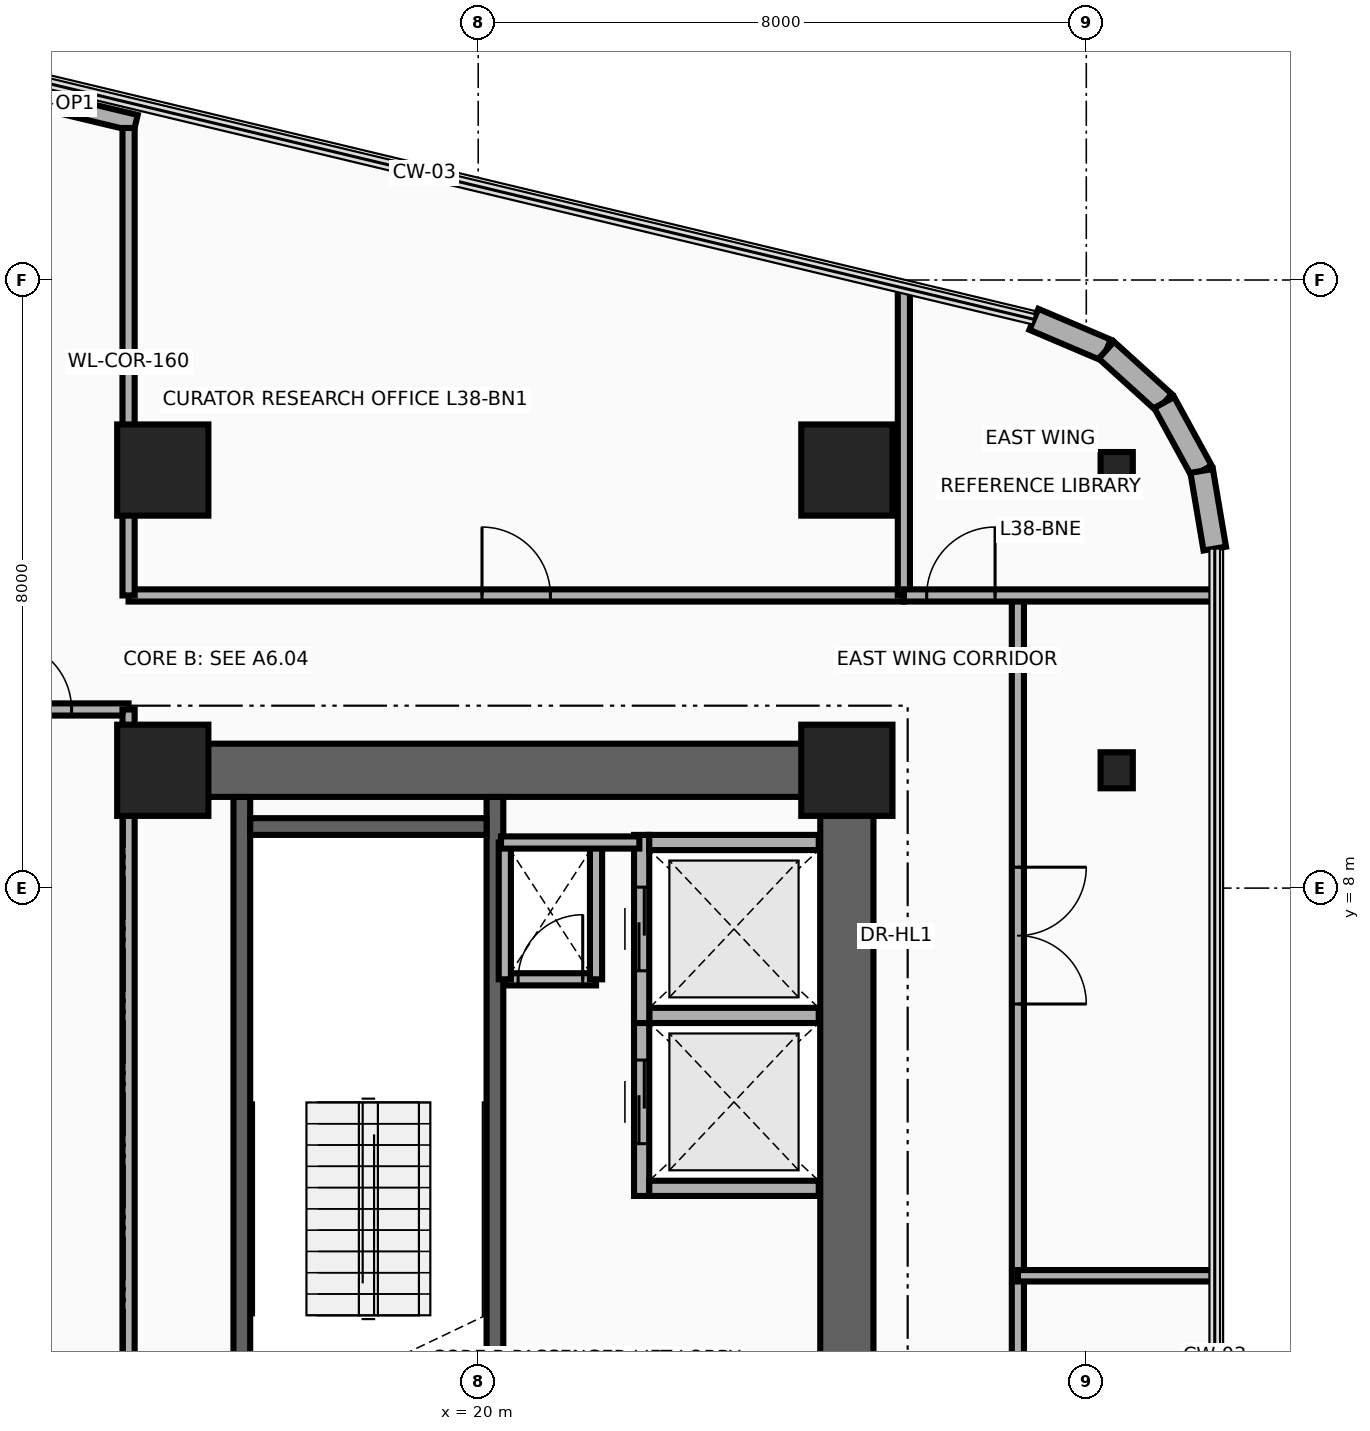
"""IFC4 building model, lengths in metres.
Left out: names, types, materials, properties, quantities, classifications, styles, units other than length and angle.
Written with IfcOpenShell. Run it as: python <this file> out.ifc"""

import sys

from ifc_helpers import new_model, si_unit, direction, frame, frame_2d, origin, origin_2d, place, context, subcontext, project, spatial, rectangle, i_section, extrude, source, transform, mapped, element, fill, save


model = new_model("IFC4")
c1 = context("Model", 3, precision=1e-05, world=origin(), true_north=direction((0.0, 1.0)))
c2 = subcontext(c1, "Body", "Model", "MODEL_VIEW")
j1 = project(units=[si_unit("LENGTHUNIT", "METRE"), si_unit("PLANEANGLEUNIT", "RADIAN")], contexts=[c1])
p1 = place(None, origin())
s1 = spatial("IfcSite", under=j1, at=p1, CompositionType="ELEMENT")
p2 = place(p1, origin())
s2 = spatial("IfcBuilding", under=s1, at=p2, CompositionType="ELEMENT")
p3 = place(p2, frame((0.0, 0.0, 150.1)))
s3 = spatial("IfcBuildingStorey", under=s2, at=p3, CompositionType="ELEMENT", Elevation=150.1)
for number, where, z_axis, x_axis in (
    (1, (16.89, 0.68, 0.0), (0.0, 0.0, 1.0), (0.0, 1.0, 0.0)),
    (2, (20.22, 0.68, 0.0), (0.0, 0.0, 1.0), (0.0, 1.0, 0.0)),
):
    element("IfcWall", number, at=place(p3, frame(where, z_axis=z_axis, x_axis=x_axis)), inside=s3, PredefinedType="SHEAR", context=c2, shape_type="SweptSolid", body=[
        extrude(rectangle(XDim=8.52, YDim=0.22, at=frame_2d((4.26, 0.0))), origin(), (0.0, 0.0, 1.0), 3.46),
    ])
p4 = place(p3, frame((17.0, 8.81, 0.0), z_axis=(0.0, 0.0, 1.0), x_axis=(1.0, 0.0, 0.0)))
e3 = element("IfcWall", 3, at=p4, inside=s3, PredefinedType="SHEAR", context=c2, shape_type="SweptSolid", body=[
    extrude(rectangle(XDim=3.11, YDim=0.22, at=frame_2d((1.555, 0.0))), origin(), (0.0, 0.0, 1.0), 3.46),
])
p5 = place(p3, frame((24.85, 0.95, 0.0), z_axis=(0.0, 0.0, 1.0), x_axis=(0.0, 1.0, 0.0)))
e4 = element("IfcWall", 4, at=p5, inside=s3, PredefinedType="SHEAR", context=c2, shape_type="SweptSolid", body=[
    extrude(rectangle(XDim=8.95, YDim=0.7, at=frame_2d((4.475, 0.0))), origin(), (0.0, 0.0, 1.0), 3.46),
])
p6 = place(p3, frame((15.85, 9.55, 0.0), z_axis=(0.0, 0.0, 1.0), x_axis=(1.0, 0.0, 0.0)))
e5 = element("IfcWall", 5, at=p6, inside=s3, PredefinedType="SHEAR", context=c2, shape_type="SweptSolid", body=[
    extrude(rectangle(XDim=9.0, YDim=0.7, at=frame_2d((4.5, 0.0))), origin(), (0.0, 0.0, 1.0), 3.46),
])
m1 = source(origin(), c2, "Body", "SweptSolid", [
    extrude(rectangle(XDim=1.2, YDim=1.2, at=origin_2d()), origin(), (0.0, 0.0, 1.0), 3.7),
])
for number, where, z_axis, x_axis in (
    (6, (15.85, 9.55, 0.0), (0.0, 0.0, 1.0), (1.0, 0.0, 0.0)),
    (7, (24.85, 9.55, 0.0), (0.0, 0.0, 1.0), (1.0, 0.0, 0.0)),
):
    element("IfcColumn", number, at=place(p3, frame(where, z_axis=z_axis, x_axis=x_axis)), inside=s3, PredefinedType="COLUMN", context=c2, shape_type="MappedRepresentation", body=[
        mapped(m1, transform((0.0, 0.0, 0.0), x_axis=(1.0, 0.0, 0.0), y_axis=(0.0, 1.0, 0.0), z_axis=(0.0, 0.0, 1.0), scale=1.0)),
    ])
m2 = source(origin(), c2, "Body", "SweptSolid", [
    extrude(i_section(OverallWidth=0.424, OverallDepth=0.474, WebThickness=0.048, FlangeThickness=0.077, at=origin_2d()), origin(), (0.0, 0.0, 1.0), 3.7),
])
p7 = place(p3, frame((28.4, 9.55, 0.0), z_axis=(0.0, 0.0, 1.0), x_axis=(1.0, 0.0, 0.0)))
e8 = element("IfcColumn", 8, at=p7, inside=s3, PredefinedType="COLUMN", context=c2, shape_type="MappedRepresentation", body=[
    mapped(m2, transform((0.0, 0.0, 0.0), x_axis=(1.0, 0.0, 0.0), y_axis=(0.0, 1.0, 0.0), z_axis=(0.0, 0.0, 1.0), scale=1.0)),
])
for number, where, z_axis, x_axis in (
    (9, (15.85, 13.5, 0.0), (0.0, 0.0, 1.0), (1.0, 0.0, 0.0)),
    (10, (24.85, 13.5, 0.0), (0.0, 0.0, 1.0), (1.0, 0.0, 0.0)),
):
    element("IfcColumn", number, at=place(p3, frame(where, z_axis=z_axis, x_axis=x_axis)), inside=s3, PredefinedType="COLUMN", context=c2, shape_type="MappedRepresentation", body=[
        mapped(m1, transform((0.0, 0.0, 0.0), x_axis=(1.0, 0.0, 0.0), y_axis=(0.0, 1.0, 0.0), z_axis=(0.0, 0.0, 1.0), scale=1.0)),
    ])
p8 = place(p3, frame((28.4, 13.5, 0.0), z_axis=(0.0, 0.0, 1.0), x_axis=(1.0, 0.0, 0.0)))
e11 = element("IfcColumn", 11, at=p8, inside=s3, PredefinedType="COLUMN", context=c2, shape_type="MappedRepresentation", body=[
    mapped(m2, transform((0.0, 0.0, 0.0), x_axis=(1.0, 0.0, 0.0), y_axis=(0.0, 1.0, 0.0), z_axis=(0.0, 0.0, 1.0), scale=1.0)),
])
p9 = place(p3, frame((13.355, 18.576, 0.0), z_axis=(0.0, 0.0, 1.0), x_axis=(0.97252211384, -0.232810519721, 0.0)))
e12 = element("IfcWall", 12, at=p9, inside=s3, PredefinedType="SOLIDWALL", context=c2, shape_type="SweptSolid", body=[
    extrude(rectangle(XDim=2.2, YDim=0.22, at=frame_2d((1.1, 0.0))), origin(), (0.0, 0.0, 1.0), 3.46),
])
p10 = place(p9, frame((0.65, 0.0, 0.95)))
e13 = element("IfcOpeningElement", 13, at=p10, cuts=e12, PredefinedType="OPENING", context=c2, shape_type="SweptSolid", body=[
    extrude(rectangle(XDim=0.9, YDim=1.3, at=frame_2d((0.45, 0.65))), frame((0.0, 0.125, 0.0), z_axis=(0.0, -1.0, 0.0), x_axis=(1.0, 0.0, 0.0)), (0.0, 0.0, 1.0), 0.25),
])
p11 = place(p3, frame((27.31, 15.483, 0.0), z_axis=(0.0, 0.0, 1.0), x_axis=(0.920250328759, -0.391330208927, 0.0)))
e14 = element("IfcWall", 14, at=p11, inside=s3, PredefinedType="SOLIDWALL", context=c2, shape_type="SweptSolid", body=[
    extrude(rectangle(XDim=1.036, YDim=0.3, at=frame_2d((0.518, 0.0))), origin(), (0.0, 0.0, 1.0), 3.46),
])
p12 = place(p3, frame((28.264, 15.077, 0.0), z_axis=(0.0, 0.0, 1.0), x_axis=(0.741208839713, -0.671274501178, 0.0)))
e15 = element("IfcWall", 15, at=p12, inside=s3, PredefinedType="SOLIDWALL", context=c2, shape_type="SweptSolid", body=[
    extrude(rectangle(XDim=1.026, YDim=0.3, at=frame_2d((0.513, 0.0))), origin(), (0.0, 0.0, 1.0), 3.46),
])
p13 = place(p3, frame((29.025, 14.388, 0.0), z_axis=(0.0, 0.0, 1.0), x_axis=(0.480284137298, -0.87711296163, 0.0)))
e16 = element("IfcWall", 16, at=p13, inside=s3, PredefinedType="SOLIDWALL", context=c2, shape_type="SweptSolid", body=[
    extrude(rectangle(XDim=1.027, YDim=0.3, at=frame_2d((0.513, 0.0))), origin(), (0.0, 0.0, 1.0), 3.46),
])
p14 = place(p3, frame((29.518, 13.488, 0.0), z_axis=(0.0, 0.0, 1.0), x_axis=(0.166156796952, -0.986099345313, 0.0)))
e17 = element("IfcWall", 17, at=p14, inside=s3, PredefinedType="SOLIDWALL", context=c2, shape_type="SweptSolid", body=[
    extrude(rectangle(XDim=1.036, YDim=0.3, at=frame_2d((0.518, 0.0))), origin(), (0.0, 0.0, 1.0), 3.46),
])
p15 = place(p3, frame((22.15, 3.95, 0.0), z_axis=(0.0, 0.0, 1.0), x_axis=(0.0, 1.0, 0.0)))
e18 = element("IfcWall", 18, at=p15, inside=s3, PredefinedType="MOVABLE", context=c2, shape_type="SweptSolid", body=[
    extrude(rectangle(XDim=2.475, YDim=0.2, at=frame_2d((1.238, 0.0))), origin(), (0.0, 0.0, 1.0), 3.46),
])
p16 = place(p15, frame((0.688, 0.0, 0.0)))
e19 = element("IfcOpeningElement", 19, at=p16, cuts=e18, PredefinedType="OPENING", context=c2, shape_type="SweptSolid", body=[
    extrude(rectangle(XDim=1.1, YDim=2.1, at=frame_2d((0.55, 1.05))), frame((0.0, 0.115, 0.0), z_axis=(0.0, -1.0, 0.0), x_axis=(1.0, 0.0, 0.0)), (0.0, 0.0, 1.0), 0.23),
])
for number, where, z_axis, x_axis in (
    (20, (22.25, 4.05, 0.0), (0.0, 0.0, 1.0), (1.0, 0.0, 0.0)),
    (21, (22.25, 6.325, 0.0), (0.0, 0.0, 1.0), (1.0, 0.0, 0.0)),
):
    element("IfcWall", number, at=place(p3, frame(where, z_axis=z_axis, x_axis=x_axis)), inside=s3, PredefinedType="MOVABLE", context=c2, shape_type="SweptSolid", body=[
        extrude(rectangle(XDim=2.23, YDim=0.2, at=frame_2d((1.115, 0.0))), origin(), (0.0, 0.0, 1.0), 2.245),
    ])
p17 = place(p3, frame((22.15, 6.225, 0.0), z_axis=(0.0, 0.0, 1.0), x_axis=(0.0, 1.0, 0.0)))
e22 = element("IfcWall", 22, at=p17, inside=s3, PredefinedType="MOVABLE", context=c2, shape_type="SweptSolid", body=[
    extrude(rectangle(XDim=2.475, YDim=0.2, at=frame_2d((1.237, 0.0))), origin(), (0.0, 0.0, 1.0), 3.46),
])
p18 = place(p17, frame((0.688, 0.0, 0.0)))
e23 = element("IfcOpeningElement", 23, at=p18, cuts=e22, PredefinedType="OPENING", context=c2, shape_type="SweptSolid", body=[
    extrude(rectangle(XDim=1.1, YDim=2.1, at=frame_2d((0.55, 1.05))), frame((0.0, 0.115, 0.0), z_axis=(0.0, -1.0, 0.0), x_axis=(1.0, 0.0, 0.0)), (0.0, 0.0, 1.0), 0.23),
])
p19 = place(p3, frame((22.25, 8.6, 0.0), z_axis=(0.0, 0.0, 1.0), x_axis=(1.0, 0.0, 0.0)))
e24 = element("IfcWall", 24, at=p19, inside=s3, PredefinedType="MOVABLE", context=c2, shape_type="SweptSolid", body=[
    extrude(rectangle(XDim=2.23, YDim=0.2, at=frame_2d((1.115, 0.0))), origin(), (0.0, 0.0, 1.0), 2.245),
])
p20 = place(p3, frame((20.35, 6.8, 0.0), z_axis=(0.0, 0.0, 1.0), x_axis=(1.0, 0.0, 0.0)))
e25 = element("IfcWall", 25, at=p20, inside=s3, PredefinedType="PARTITIONING", context=c2, shape_type="SweptSolid", body=[
    extrude(rectangle(XDim=1.2, YDim=0.16, at=frame_2d((0.6, 0.0))), origin(), (0.0, 0.0, 1.0), 3.46),
])
p21 = place(p20, frame((0.175, 0.0, 0.0)))
e26 = element("IfcOpeningElement", 26, at=p21, cuts=e25, PredefinedType="OPENING", context=c2, shape_type="SweptSolid", body=[
    extrude(rectangle(XDim=0.85, YDim=2.05, at=frame_2d((0.425, 1.025))), frame((0.0, 0.095, 0.0), z_axis=(0.0, -1.0, 0.0), x_axis=(1.0, 0.0, 0.0)), (0.0, 0.0, 1.0), 0.19),
])
for number, where, z_axis, x_axis in (
    (27, (21.55, 6.8, 0.0), (0.0, 0.0, 1.0), (0.0, 1.0, 0.0)),
    (28, (20.35, 6.8, 0.0), (0.0, 0.0, 1.0), (0.0, 1.0, 0.0)),
):
    element("IfcWall", number, at=place(p3, frame(where, z_axis=z_axis, x_axis=x_axis)), inside=s3, PredefinedType="PARTITIONING", context=c2, shape_type="SweptSolid", body=[
        extrude(rectangle(XDim=1.8, YDim=0.16, at=frame_2d((0.9, 0.0))), origin(), (0.0, 0.0, 1.0), 3.46),
    ])
p22 = place(p3, frame((20.3, 8.6, 0.0), z_axis=(0.0, 0.0, 1.0), x_axis=(1.0, 0.0, 0.0)))
e29 = element("IfcWall", 29, at=p22, inside=s3, PredefinedType="PARTITIONING", context=c2, shape_type="SweptSolid", body=[
    extrude(rectangle(XDim=1.82, YDim=0.16, at=frame_2d((0.91, 0.0))), origin(), (0.0, 0.0, 1.0), 3.46),
])
p23 = place(p3, frame((15.4, 11.85, 0.0), z_axis=(0.0, 0.0, 1.0), x_axis=(1.0, 0.0, 0.0)))
e30 = element("IfcWall", 30, at=p23, inside=s3, PredefinedType="PARTITIONING", context=c2, shape_type="SweptSolid", body=[
    extrude(rectangle(XDim=10.2, YDim=0.16, at=frame_2d((5.1, 0.0))), origin(), (0.0, 0.0, 1.0), 2.834),
])
p24 = place(p23, frame((4.65, 0.0, 0.0)))
e31 = element("IfcOpeningElement", 31, at=p24, cuts=e30, PredefinedType="OPENING", context=c2, shape_type="SweptSolid", body=[
    extrude(rectangle(XDim=0.9, YDim=2.1, at=frame_2d((0.45, 1.05))), frame((0.0, 0.095, 0.0), z_axis=(0.0, -1.0, 0.0), x_axis=(1.0, 0.0, 0.0)), (0.0, 0.0, 1.0), 0.19),
])
p25 = place(p3, frame((15.4, 11.85, 0.0), z_axis=(0.0, 0.0, 1.0), x_axis=(0.0, 1.0, 0.0)))
e32 = element("IfcWall", 32, at=p25, inside=s3, PredefinedType="PARTITIONING", context=c2, shape_type="SweptSolid", body=[
    extrude(rectangle(XDim=6.15, YDim=0.16, at=frame_2d((3.075, 0.0))), origin(), (0.0, 0.0, 1.0), 2.666),
])
p26 = place(p3, frame((25.6, 11.85, 0.0), z_axis=(0.0, 0.0, 1.0), x_axis=(0.0, 1.0, 0.0)))
e33 = element("IfcWall", 33, at=p26, inside=s3, PredefinedType="PARTITIONING", context=c2, shape_type="SweptSolid", body=[
    extrude(rectangle(XDim=4.042, YDim=0.16, at=frame_2d((2.021, 0.0))), origin(), (0.0, 0.0, 1.0), 2.666),
])
p27 = place(p3, frame((27.1, -11.661, 0.0), z_axis=(0.0, 0.0, 1.0), x_axis=(0.0, 1.0, 0.0)))
e34 = element("IfcWall", 34, at=p27, inside=s3, PredefinedType="PARTITIONING", context=c2, shape_type="SweptSolid", body=[
    extrude(rectangle(XDim=23.511, YDim=0.16, at=frame_2d((11.755, 0.0))), origin(), (0.0, 0.0, 1.0), 2.666),
])
p28 = place(p27, frame((2.56, 0.0, 0.0)))
e35 = element("IfcOpeningElement", 35, at=p28, cuts=e34, PredefinedType="OPENING", context=c2, shape_type="SweptSolid", body=[
    extrude(rectangle(XDim=0.9, YDim=2.1, at=frame_2d((0.45, 1.05))), frame((0.0, 0.095, 0.0), z_axis=(0.0, -1.0, 0.0), x_axis=(1.0, 0.0, 0.0)), (0.0, 0.0, 1.0), 0.19),
])
p29 = place(p27, frame((9.451, 0.0, 0.0)))
e36 = element("IfcOpeningElement", 36, at=p29, cuts=e34, PredefinedType="OPENING", context=c2, shape_type="SweptSolid", body=[
    extrude(rectangle(XDim=1.8, YDim=2.15, at=frame_2d((0.9, 1.075))), frame((0.0, 0.095, 0.0), z_axis=(0.0, -1.0, 0.0), x_axis=(1.0, 0.0, 0.0)), (0.0, 0.0, 1.0), 0.19),
])
p30 = place(p27, frame((18.136, 0.0, 0.0)))
e37 = element("IfcOpeningElement", 37, at=p30, cuts=e34, PredefinedType="OPENING", context=c2, shape_type="SweptSolid", body=[
    extrude(rectangle(XDim=1.8, YDim=2.15, at=frame_2d((0.9, 1.075))), frame((0.0, 0.095, 0.0), z_axis=(0.0, -1.0, 0.0), x_axis=(1.0, 0.0, 0.0)), (0.0, 0.0, 1.0), 0.19),
])
p31 = place(p3, frame((25.6, 11.85, 0.0), z_axis=(0.0, 0.0, 1.0), x_axis=(1.0, 0.0, 0.0)))
e38 = element("IfcWall", 38, at=p31, inside=s3, PredefinedType="PARTITIONING", context=c2, shape_type="SweptSolid", body=[
    extrude(rectangle(XDim=4.09, YDim=0.16, at=frame_2d((2.045, 0.0))), origin(), (0.0, 0.0, 1.0), 2.896),
])
p32 = place(p31, frame((0.3, 0.0, 0.0)))
e39 = element("IfcOpeningElement", 39, at=p32, cuts=e38, PredefinedType="OPENING", context=c2, shape_type="SweptSolid", body=[
    extrude(rectangle(XDim=0.9, YDim=2.1, at=frame_2d((0.45, 1.05))), frame((0.0, 0.095, 0.0), z_axis=(0.0, -1.0, 0.0), x_axis=(1.0, 0.0, 0.0)), (0.0, 0.0, 1.0), 0.19),
])
p33 = place(p3, frame((27.1, 2.9, 0.0), z_axis=(0.0, 0.0, 1.0), x_axis=(1.0, 0.0, 0.0)))
e40 = element("IfcWall", 40, at=p33, inside=s3, PredefinedType="PARTITIONING", context=c2, shape_type="SweptSolid", body=[
    extrude(rectangle(XDim=2.59, YDim=0.15, at=frame_2d((1.295, 0.0))), origin(), (0.0, 0.0, 1.0), 2.896),
])
p34 = place(p3, frame((13.3, 10.35, 0.0), z_axis=(0.0, 0.0, 1.0), x_axis=(1.0, 0.0, 0.0)))
e41 = element("IfcWall", 41, at=p34, inside=s3, PredefinedType="PARTITIONING", context=c2, shape_type="SweptSolid", body=[
    extrude(rectangle(XDim=2.1, YDim=0.16, at=frame_2d((1.05, 0.0))), origin(), (0.0, 0.0, 1.0), 2.666),
])
p35 = place(p34, frame((0.45, 0.0, 0.0)))
e42 = element("IfcOpeningElement", 42, at=p35, cuts=e41, PredefinedType="OPENING", context=c2, shape_type="SweptSolid", body=[
    extrude(rectangle(XDim=0.9, YDim=2.1, at=frame_2d((0.45, 1.05))), frame((0.0, 0.095, 0.0), z_axis=(0.0, -1.0, 0.0), x_axis=(1.0, 0.0, 0.0)), (0.0, 0.0, 1.0), 0.19),
])
p36 = place(p3, frame((15.4, 1.0, 0.0), z_axis=(0.0, 0.0, 1.0), x_axis=(0.0, 1.0, 0.0)))
e43 = element("IfcWall", 43, at=p36, inside=s3, PredefinedType="PARTITIONING", context=c2, shape_type="SweptSolid", body=[
    extrude(rectangle(XDim=9.35, YDim=0.16, at=frame_2d((4.675, 0.0))), origin(), (0.0, 0.0, 1.0), 2.245),
])
p37 = place(p10, origin())
e44 = element("IfcWindow", 44, at=p37, inside=s3, PartitioningType="SINGLE_PANEL", PredefinedType="WINDOW", context=c2, shape_type="SweptSolid", body=[
    extrude(rectangle(XDim=0.9, YDim=1.3, at=frame_2d((0.45, 0.65))), frame((0.0, 0.03, 0.0), z_axis=(0.0, -1.0, 0.0), x_axis=(1.0, 0.0, 0.0)), (0.0, 0.0, 1.0), 0.06),
])
fill(e13, e44)
p38 = place(p16, origin())
e45 = element("IfcDoor", 45, at=p38, inside=s3, OperationType="DOUBLE_DOOR_SLIDING", PredefinedType="DOOR", context=c2, shape_type="SweptSolid", body=[
    extrude(rectangle(XDim=1.1, YDim=2.1, at=frame_2d((0.55, 1.05))), frame((0.0, 0.025, 0.0), z_axis=(0.0, -1.0, 0.0), x_axis=(1.0, 0.0, 0.0)), (0.0, 0.0, 1.0), 0.05),
])
fill(e19, e45)
p39 = place(p18, origin())
e46 = element("IfcDoor", 46, at=p39, inside=s3, OperationType="DOUBLE_DOOR_SLIDING", PredefinedType="DOOR", context=c2, shape_type="SweptSolid", body=[
    extrude(rectangle(XDim=1.1, YDim=2.1, at=frame_2d((0.55, 1.05))), frame((0.0, 0.025, 0.0), z_axis=(0.0, -1.0, 0.0), x_axis=(1.0, 0.0, 0.0)), (0.0, 0.0, 1.0), 0.05),
])
fill(e23, e46)
p40 = place(p21, origin())
e47 = element("IfcDoor", 47, at=p40, inside=s3, OperationType="SINGLE_SWING_LEFT", PredefinedType="DOOR", context=c2, shape_type="SweptSolid", body=[
    extrude(rectangle(XDim=0.85, YDim=2.05, at=frame_2d((0.425, 1.025))), frame((0.0, 0.025, 0.0), z_axis=(0.0, -1.0, 0.0), x_axis=(1.0, 0.0, 0.0)), (0.0, 0.0, 1.0), 0.05),
])
fill(e26, e47)
p41 = place(p24, origin())
e48 = element("IfcDoor", 48, at=p41, inside=s3, OperationType="SINGLE_SWING_RIGHT", PredefinedType="DOOR", context=c2, shape_type="SweptSolid", body=[
    extrude(rectangle(XDim=0.9, YDim=2.1, at=frame_2d((0.45, 1.05))), frame((0.0, 0.025, 0.0), z_axis=(0.0, -1.0, 0.0), x_axis=(1.0, 0.0, 0.0)), (0.0, 0.0, 1.0), 0.05),
])
fill(e31, e48)
p42 = place(p32, origin())
e49 = element("IfcDoor", 49, at=p42, inside=s3, OperationType="SINGLE_SWING_RIGHT", PredefinedType="DOOR", context=c2, shape_type="SweptSolid", body=[
    extrude(rectangle(XDim=0.9, YDim=2.1, at=frame_2d((0.45, 1.05))), frame((0.0, 0.025, 0.0), z_axis=(0.0, -1.0, 0.0), x_axis=(1.0, 0.0, 0.0)), (0.0, 0.0, 1.0), 0.05),
])
fill(e39, e49)
p43 = place(p30, frame((1.8, 0.0, 0.0), z_axis=(0.0, 0.0, 1.0), x_axis=(-1.0, 0.0, 0.0)))
e50 = element("IfcDoor", 50, at=p43, inside=s3, OperationType="DOUBLE_DOOR_SINGLE_SWING", PredefinedType="DOOR", context=c2, shape_type="SweptSolid", body=[
    extrude(rectangle(XDim=1.8, YDim=2.15, at=frame_2d((0.9, 1.075))), frame((0.0, 0.025, 0.0), z_axis=(0.0, -1.0, 0.0), x_axis=(1.0, 0.0, 0.0)), (0.0, 0.0, 1.0), 0.05),
])
fill(e37, e50)
p44 = place(p35, origin())
e51 = element("IfcDoor", 51, at=p44, inside=s3, OperationType="SINGLE_SWING_RIGHT", PredefinedType="DOOR", context=c2, shape_type="SweptSolid", body=[
    extrude(rectangle(XDim=0.9, YDim=2.1, at=frame_2d((0.45, 1.05))), frame((0.0, 0.025, 0.0), z_axis=(0.0, -1.0, 0.0), x_axis=(1.0, 0.0, 0.0)), (0.0, 0.0, 1.0), 0.05),
])
fill(e42, e51)
save(model, sys.argv[1])
